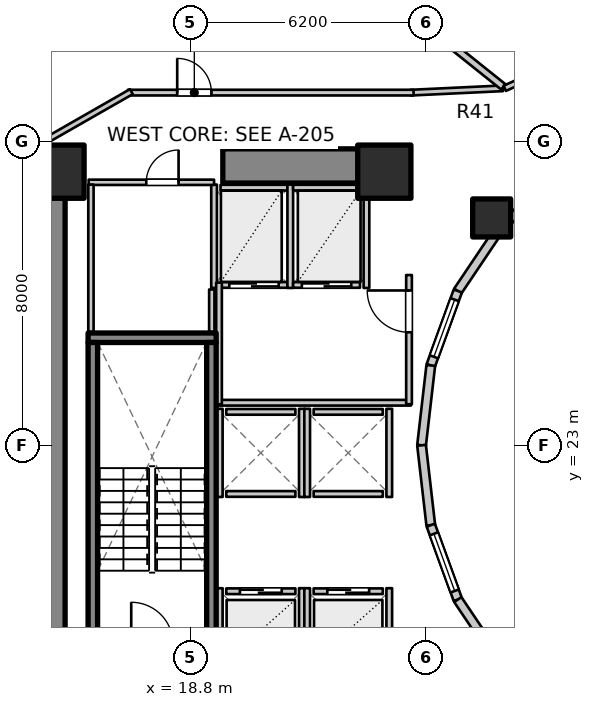
"""IFC4 building model, lengths in metres.
Left out: names, types, materials, properties, quantities, classifications, styles, units other than length and angle.
Written with IfcOpenShell. Run it as: python <this file> out.ifc"""

import sys

from ifc_helpers import new_model, si_unit, direction, frame, frame_2d, origin, origin_2d, place, context, subcontext, project, spatial, rectangle, extrude, element, fill, save


model = new_model("IFC4")
c1 = context("Model", 3, precision=1e-05, world=origin(), true_north=direction((0.0, 1.0)))
c2 = subcontext(c1, "Body", "Model", "MODEL_VIEW")
j1 = project(units=[si_unit("LENGTHUNIT", "METRE"), si_unit("PLANEANGLEUNIT", "RADIAN")], contexts=[c1])
p1 = place(None, origin())
s1 = spatial("IfcSite", under=j1, at=p1, CompositionType="ELEMENT")
p2 = place(p1, origin())
s2 = spatial("IfcBuilding", under=s1, at=p2, CompositionType="ELEMENT")
p3 = place(p2, frame((0.0, 0.0, 27.6)))
s3 = spatial("IfcBuildingStorey", under=s2, at=p3, CompositionType="ELEMENT", Elevation=27.6)
p4 = place(p3, frame((15.05, 17.05, 0.0), z_axis=(0.0, 0.0, 1.0), x_axis=(0.0, 1.0, 0.0)))
e1 = element("IfcWall", 1, at=p4, inside=s3, PredefinedType="SHEAR", context=c2, shape_type="SweptSolid", body=[
    extrude(rectangle(XDim=12.8, YDim=0.9, at=frame_2d((6.4, 0.0))), origin(), (0.0, 0.0, 1.0), 3.1),
])
p5 = place(p3, frame((19.65, 30.35, 0.0), z_axis=(0.0, 0.0, 1.0), x_axis=(1.0, 0.0, 0.0)))
e2 = element("IfcWall", 2, at=p5, inside=s3, PredefinedType="SHEAR", context=c2, shape_type="SweptSolid", body=[
    extrude(rectangle(XDim=4.5, YDim=0.9, at=frame_2d((2.25, 0.0))), origin(), (0.0, 0.0, 1.0), 3.1),
])
p6 = place(p3, frame((16.105, 25.83, 0.0), z_axis=(0.0, 0.0, 1.0), x_axis=(1.0, 0.0, 0.0)))
e3 = element("IfcWall", 3, at=p6, inside=s3, PredefinedType="SOLIDWALL", context=c2, shape_type="SweptSolid", body=[
    extrude(rectangle(XDim=3.37, YDim=0.25, at=frame_2d((1.685, 0.0))), origin(), (0.0, 0.0, 1.0), 3.1),
])
for number, where, z_axis, x_axis in (
    (4, (16.23, 17.895, 0.0), (0.0, 0.0, 1.0), (0.0, 1.0, 0.0)),
    (5, (19.35, 17.895, 0.0), (0.0, 0.0, 1.0), (0.0, 1.0, 0.0)),
):
    element("IfcWall", number, at=place(p3, frame(where, z_axis=z_axis, x_axis=x_axis)), inside=s3, PredefinedType="SOLIDWALL", context=c2, shape_type="SweptSolid", body=[
        extrude(rectangle(XDim=7.81, YDim=0.25, at=frame_2d((3.905, 0.0))), origin(), (0.0, 0.0, 1.0), 3.1),
    ])
for number, where, z_axis, x_axis in (
    (6, (23.9, 30.2, 0.0), (0.0, 0.0, 1.0), (1.0, 0.0, 0.0)),
    (7, (15.3, 30.2, 0.0), (0.0, 0.0, 1.0), (1.0, 0.0, 0.0)),
):
    element("IfcColumn", number, at=place(p3, frame(where, z_axis=z_axis, x_axis=x_axis)), inside=s3, PredefinedType="COLUMN", context=c2, shape_type="SweptSolid", body=[
        extrude(rectangle(XDim=1.4, YDim=1.4, at=origin_2d()), origin(), (0.0, 0.0, 1.0), 3.1),
    ])
p7 = place(p3, frame((26.725, 28.982, 0.0), z_axis=(0.0, 0.0, 1.0), x_axis=(1.0, 0.0, 0.0)))
e8 = element("IfcColumn", 8, at=p7, inside=s3, PredefinedType="COLUMN", context=c2, shape_type="SweptSolid", body=[
    extrude(rectangle(XDim=1.0, YDim=1.0, at=origin_2d()), origin(), (0.0, 0.0, 1.0), 3.1),
])
p8 = place(p3, frame((28.44, 30.032, 0.0), z_axis=(0.0, 0.0, 1.0), x_axis=(-0.752576694707, -0.658504607869, 0.0)))
e9 = element("IfcWall", 9, at=p8, inside=s3, PredefinedType="STANDARD", context=c2, shape_type="SweptSolid", body=[
    extrude(rectangle(XDim=1.959, YDim=0.23, at=frame_2d((0.98, 0.0))), origin(), (0.0, 0.0, 1.0), 2.16),
])
p9 = place(p3, frame((26.965, 28.742, 0.0), z_axis=(0.0, 0.0, 1.0), x_axis=(-0.558197800898, -0.829707909492, 0.0)))
e10 = element("IfcWall", 10, at=p9, inside=s3, PredefinedType="STANDARD", context=c2, shape_type="SweptSolid", body=[
    extrude(rectangle(XDim=2.027, YDim=0.23, at=frame_2d((1.013, 0.0))), origin(), (0.0, 0.0, 1.0), 2.16),
])
p10 = place(p3, frame((25.834, 27.06, 0.0), z_axis=(0.0, 0.0, 1.0), x_axis=(-0.341423187295, -0.93990968033, 0.0)))
e11 = element("IfcWall", 11, at=p10, inside=s3, PredefinedType="STANDARD", context=c2, shape_type="SweptSolid", body=[
    extrude(rectangle(XDim=2.084, YDim=0.23, at=frame_2d((1.042, 0.0))), origin(), (0.0, 0.0, 1.0), 2.84),
])
p11 = place(p10, frame((0.242, 0.0, 0.85)))
e12 = element("IfcOpeningElement", 12, at=p11, cuts=e11, PredefinedType="OPENING", context=c2, shape_type="SweptSolid", body=[
    extrude(rectangle(XDim=1.6, YDim=1.65, at=frame_2d((0.8, 0.825))), frame((0.0, 0.125, 0.0), z_axis=(0.0, -1.0, 0.0), x_axis=(1.0, 0.0, 0.0)), (0.0, 0.0, 1.0), 0.25),
])
for number, where, z_axis, x_axis in (
    (13, (25.123, 25.102, 0.0), (0.0, 0.0, 1.0), (-0.115, -0.993, 0.0)),
    (14, (24.88, 23.0, 0.0), (0.0, 0.0, 1.0), (0.115, -0.993, 0.0)),
):
    element("IfcWall", number, at=place(p3, frame(where, z_axis=z_axis, x_axis=x_axis)), inside=s3, PredefinedType="STANDARD", context=c2, shape_type="SweptSolid", body=[
        extrude(rectangle(XDim=2.115, YDim=0.23, at=frame_2d((1.058, 0.0))), origin(), (0.0, 0.0, 1.0), 2.84),
    ])
p12 = place(p3, frame((25.123, 20.898, 0.0), z_axis=(0.0, 0.0, 1.0), x_axis=(0.341423187295, -0.93990968033, 0.0)))
e15 = element("IfcWall", 15, at=p12, inside=s3, PredefinedType="STANDARD", context=c2, shape_type="SweptSolid", body=[
    extrude(rectangle(XDim=2.084, YDim=0.23, at=frame_2d((1.042, 0.0))), origin(), (0.0, 0.0, 1.0), 2.84),
])
p13 = place(p12, frame((0.242, 0.0, 0.85)))
e16 = element("IfcOpeningElement", 16, at=p13, cuts=e15, PredefinedType="OPENING", context=c2, shape_type="SweptSolid", body=[
    extrude(rectangle(XDim=1.6, YDim=1.65, at=frame_2d((0.8, 0.825))), frame((0.0, 0.125, 0.0), z_axis=(0.0, -1.0, 0.0), x_axis=(1.0, 0.0, 0.0)), (0.0, 0.0, 1.0), 0.25),
])
p14 = place(p3, frame((25.834, 18.94, 0.0), z_axis=(0.0, 0.0, 1.0), x_axis=(0.558197800898, -0.829707909492, 0.0)))
e17 = element("IfcWall", 17, at=p14, inside=s3, PredefinedType="STANDARD", context=c2, shape_type="SweptSolid", body=[
    extrude(rectangle(XDim=2.027, YDim=0.23, at=frame_2d((1.013, 0.0))), origin(), (0.0, 0.0, 1.0), 2.16),
])
p15 = place(p3, frame((19.74, 19.16, 0.0), z_axis=(0.0, 0.0, 1.0), x_axis=(1.0, 0.0, 0.0)))
e18 = element("IfcWall", 18, at=p15, inside=s3, PredefinedType="SOLIDWALL", context=c2, shape_type="SweptSolid", body=[
    extrude(rectangle(XDim=1.82, YDim=0.15, at=frame_2d((0.91, 0.0))), origin(), (0.0, 0.0, 1.0), 2.855),
])
p16 = place(p15, frame((0.36, 0.0, 0.0)))
e19 = element("IfcOpeningElement", 19, at=p16, cuts=e18, PredefinedType="OPENING", context=c2, shape_type="SweptSolid", body=[
    extrude(rectangle(XDim=1.1, YDim=2.1, at=frame_2d((0.55, 1.05))), frame((0.0, 0.085, 0.0), z_axis=(0.0, -1.0, 0.0), x_axis=(1.0, 0.0, 0.0)), (0.0, 0.0, 1.0), 0.17),
])
p17 = place(p3, frame((19.57, 17.02, 0.0), z_axis=(0.0, 0.0, 1.0), x_axis=(0.0, 1.0, 0.0)))
e20 = element("IfcWall", 20, at=p17, inside=s3, PredefinedType="SOLIDWALL", context=c2, shape_type="SweptSolid", body=[
    extrude(rectangle(XDim=2.22, YDim=0.15, at=frame_2d((1.11, 0.0))), origin(), (0.0, 0.0, 1.0), 2.12),
])
p18 = place(p3, frame((21.73, 17.02, 0.0), z_axis=(0.0, 0.0, 1.0), x_axis=(0.0, 1.0, 0.0)))
e21 = element("IfcWall", 21, at=p18, inside=s3, PredefinedType="SOLIDWALL", context=c2, shape_type="SweptSolid", body=[
    extrude(rectangle(XDim=2.22, YDim=0.15, at=frame_2d((1.11, 0.0))), origin(), (0.0, 0.0, 1.0), 2.855),
])
p19 = place(p3, frame((22.04, 19.16, 0.0), z_axis=(0.0, 0.0, 1.0), x_axis=(1.0, 0.0, 0.0)))
e22 = element("IfcWall", 22, at=p19, inside=s3, PredefinedType="SOLIDWALL", context=c2, shape_type="SweptSolid", body=[
    extrude(rectangle(XDim=1.82, YDim=0.15, at=frame_2d((0.91, 0.0))), origin(), (0.0, 0.0, 1.0), 2.12),
])
p20 = place(p19, frame((0.36, 0.0, 0.0)))
e23 = element("IfcOpeningElement", 23, at=p20, cuts=e22, PredefinedType="OPENING", context=c2, shape_type="SweptSolid", body=[
    extrude(rectangle(XDim=1.1, YDim=2.1, at=frame_2d((0.55, 1.05))), frame((0.0, 0.085, 0.0), z_axis=(0.0, -1.0, 0.0), x_axis=(1.0, 0.0, 0.0)), (0.0, 0.0, 1.0), 0.17),
])
p21 = place(p3, frame((21.87, 17.02, 0.0), z_axis=(0.0, 0.0, 1.0), x_axis=(0.0, 1.0, 0.0)))
e24 = element("IfcWall", 24, at=p21, inside=s3, PredefinedType="SOLIDWALL", context=c2, shape_type="SweptSolid", body=[
    extrude(rectangle(XDim=2.22, YDim=0.15, at=frame_2d((1.11, 0.0))), origin(), (0.0, 0.0, 1.0), 2.855),
])
p22 = place(p3, frame((24.03, 17.02, 0.0), z_axis=(0.0, 0.0, 1.0), x_axis=(0.0, 1.0, 0.0)))
e25 = element("IfcWall", 25, at=p22, inside=s3, PredefinedType="SOLIDWALL", context=c2, shape_type="SweptSolid", body=[
    extrude(rectangle(XDim=2.22, YDim=0.15, at=frame_2d((1.11, 0.0))), origin(), (0.0, 0.0, 1.0), 2.12),
])
for number, where, z_axis, x_axis in (
    (26, (19.74, 21.72, 0.0), (0.0, 0.0, 1.0), (1.0, 0.0, 0.0)),
    (27, (19.74, 23.88, 0.0), (0.0, 0.0, 1.0), (1.0, 0.0, 0.0)),
):
    element("IfcWall", number, at=place(p3, frame(where, z_axis=z_axis, x_axis=x_axis)), inside=s3, PredefinedType="SOLIDWALL", context=c2, shape_type="SweptSolid", body=[
        extrude(rectangle(XDim=1.82, YDim=0.15, at=frame_2d((0.91, 0.0))), origin(), (0.0, 0.0, 1.0), 2.855),
    ])
for number, where, z_axis, x_axis in (
    (28, (19.57, 21.64, 0.0), (0.0, 0.0, 1.0), (0.0, 1.0, 0.0)),
    (29, (21.73, 21.64, 0.0), (0.0, 0.0, 1.0), (0.0, 1.0, 0.0)),
):
    element("IfcWall", number, at=place(p3, frame(where, z_axis=z_axis, x_axis=x_axis)), inside=s3, PredefinedType="SOLIDWALL", context=c2, shape_type="SweptSolid", body=[
        extrude(rectangle(XDim=2.32, YDim=0.15, at=frame_2d((1.16, 0.0))), origin(), (0.0, 0.0, 1.0), 2.855),
    ])
for number, where, z_axis, x_axis in (
    (30, (22.04, 21.72, 0.0), (0.0, 0.0, 1.0), (1.0, 0.0, 0.0)),
    (31, (22.04, 23.88, 0.0), (0.0, 0.0, 1.0), (1.0, 0.0, 0.0)),
):
    element("IfcWall", number, at=place(p3, frame(where, z_axis=z_axis, x_axis=x_axis)), inside=s3, PredefinedType="SOLIDWALL", context=c2, shape_type="SweptSolid", body=[
        extrude(rectangle(XDim=1.82, YDim=0.15, at=frame_2d((0.91, 0.0))), origin(), (0.0, 0.0, 1.0), 2.12),
    ])
p23 = place(p3, frame((21.87, 21.64, 0.0), z_axis=(0.0, 0.0, 1.0), x_axis=(0.0, 1.0, 0.0)))
e32 = element("IfcWall", 32, at=p23, inside=s3, PredefinedType="SOLIDWALL", context=c2, shape_type="SweptSolid", body=[
    extrude(rectangle(XDim=2.32, YDim=0.15, at=frame_2d((1.16, 0.0))), origin(), (0.0, 0.0, 1.0), 2.855),
])
p24 = place(p3, frame((24.03, 21.64, 0.0), z_axis=(0.0, 0.0, 1.0), x_axis=(0.0, 1.0, 0.0)))
e33 = element("IfcWall", 33, at=p24, inside=s3, PredefinedType="SOLIDWALL", context=c2, shape_type="SweptSolid", body=[
    extrude(rectangle(XDim=2.32, YDim=0.15, at=frame_2d((1.16, 0.0))), origin(), (0.0, 0.0, 1.0), 2.12),
])
p25 = place(p3, frame((19.59, 27.22, 0.0), z_axis=(0.0, 0.0, 1.0), x_axis=(1.0, 0.0, 0.0)))
e34 = element("IfcWall", 34, at=p25, inside=s3, PredefinedType="SOLIDWALL", context=c2, shape_type="SweptSolid", body=[
    extrude(rectangle(XDim=1.76, YDim=0.15, at=frame_2d((0.88, 0.0))), origin(), (0.0, 0.0, 1.0), 2.855),
])
p26 = place(p25, frame((0.23, 0.0, 0.0)))
e35 = element("IfcOpeningElement", 35, at=p26, cuts=e34, PredefinedType="OPENING", context=c2, shape_type="SweptSolid", body=[
    extrude(rectangle(XDim=1.3, YDim=2.1, at=frame_2d((0.65, 1.05))), frame((0.0, 0.085, 0.0), z_axis=(0.0, -1.0, 0.0), x_axis=(1.0, 0.0, 0.0)), (0.0, 0.0, 1.0), 0.17),
])
p27 = place(p3, frame((19.59, 29.78, 0.0), z_axis=(0.0, 0.0, 1.0), x_axis=(1.0, 0.0, 0.0)))
e36 = element("IfcWall", 36, at=p27, inside=s3, PredefinedType="SOLIDWALL", context=c2, shape_type="SweptSolid", body=[
    extrude(rectangle(XDim=1.76, YDim=0.15, at=frame_2d((0.88, 0.0))), origin(), (0.0, 0.0, 1.0), 2.855),
])
for number, where, z_axis, x_axis in (
    (37, (19.42, 27.14, 0.0), (0.0, 0.0, 1.0), (0.0, 1.0, 0.0)),
    (38, (21.425, 27.14, 0.0), (0.0, 0.0, 1.0), (0.0, 1.0, 0.0)),
):
    element("IfcWall", number, at=place(p3, frame(where, z_axis=z_axis, x_axis=x_axis)), inside=s3, PredefinedType="SOLIDWALL", context=c2, shape_type="SweptSolid", body=[
        extrude(rectangle(XDim=2.72, YDim=0.15, at=frame_2d((1.36, 0.0))), origin(), (0.0, 0.0, 1.0), 2.855),
    ])
p28 = place(p3, frame((21.5, 27.22, 0.0), z_axis=(0.0, 0.0, 1.0), x_axis=(1.0, 0.0, 0.0)))
e39 = element("IfcWall", 39, at=p28, inside=s3, PredefinedType="SOLIDWALL", context=c2, shape_type="SweptSolid", body=[
    extrude(rectangle(XDim=1.76, YDim=0.15, at=frame_2d((0.88, 0.0))), origin(), (0.0, 0.0, 1.0), 2.855),
])
p29 = place(p28, frame((0.23, 0.0, 0.0)))
e40 = element("IfcOpeningElement", 40, at=p29, cuts=e39, PredefinedType="OPENING", context=c2, shape_type="SweptSolid", body=[
    extrude(rectangle(XDim=1.3, YDim=2.1, at=frame_2d((0.65, 1.05))), frame((0.0, 0.085, 0.0), z_axis=(0.0, -1.0, 0.0), x_axis=(1.0, 0.0, 0.0)), (0.0, 0.0, 1.0), 0.17),
])
p30 = place(p3, frame((21.5, 29.78, 0.0), z_axis=(0.0, 0.0, 1.0), x_axis=(1.0, 0.0, 0.0)))
e41 = element("IfcWall", 41, at=p30, inside=s3, PredefinedType="SOLIDWALL", context=c2, shape_type="SweptSolid", body=[
    extrude(rectangle(XDim=1.76, YDim=0.15, at=frame_2d((0.88, 0.0))), origin(), (0.0, 0.0, 1.0), 2.855),
])
p31 = place(p3, frame((23.43, 27.14, 0.0), z_axis=(0.0, 0.0, 1.0), x_axis=(0.0, 1.0, 0.0)))
e42 = element("IfcWall", 42, at=p31, inside=s3, PredefinedType="SOLIDWALL", context=c2, shape_type="SweptSolid", body=[
    extrude(rectangle(XDim=2.72, YDim=0.15, at=frame_2d((1.36, 0.0))), origin(), (0.0, 0.0, 1.0), 2.855),
])
p32 = place(p3, frame((19.52, 24.12, 0.0), z_axis=(0.0, 0.0, 1.0), x_axis=(1.0, 0.0, 0.0)))
e43 = element("IfcWall", 43, at=p32, inside=s3, PredefinedType="PARTITIONING", context=c2, shape_type="SweptSolid", body=[
    extrude(rectangle(XDim=5.08, YDim=0.15, at=frame_2d((2.54, 0.0))), origin(), (0.0, 0.0, 1.0), 2.12),
])
p33 = place(p3, frame((19.55, 24.08, 0.0), z_axis=(0.0, 0.0, 1.0), x_axis=(0.0, 1.0, 0.0)))
e44 = element("IfcWall", 44, at=p33, inside=s3, PredefinedType="PARTITIONING", context=c2, shape_type="SweptSolid", body=[
    extrude(rectangle(XDim=3.2, YDim=0.15, at=frame_2d((1.6, 0.0))), origin(), (0.0, 0.0, 1.0), 2.855),
])
p34 = place(p3, frame((24.55, 24.08, 0.0), z_axis=(0.0, 0.0, 1.0), x_axis=(0.0, 1.0, 0.0)))
e45 = element("IfcWall", 45, at=p34, inside=s3, PredefinedType="PARTITIONING", context=c2, shape_type="SweptSolid", body=[
    extrude(rectangle(XDim=3.4, YDim=0.15, at=frame_2d((1.7, 0.0))), origin(), (0.0, 0.0, 1.0), 2.855),
])
p35 = place(p34, frame((1.894, 0.0, 0.0)))
e46 = element("IfcOpeningElement", 46, at=p35, cuts=e45, PredefinedType="OPENING", context=c2, shape_type="SweptSolid", body=[
    extrude(rectangle(XDim=1.1, YDim=2.1, at=frame_2d((0.55, 1.05))), frame((0.0, 0.085, 0.0), z_axis=(0.0, -1.0, 0.0), x_axis=(1.0, 0.0, 0.0)), (0.0, 0.0, 1.0), 0.17),
])
p36 = place(p3, frame((16.12, 29.92, 0.0), z_axis=(0.0, 0.0, 1.0), x_axis=(1.0, 0.0, 0.0)))
e47 = element("IfcWall", 47, at=p36, inside=s3, PredefinedType="PLUMBINGWALL", context=c2, shape_type="SweptSolid", body=[
    extrude(rectangle(XDim=3.3, YDim=0.14, at=frame_2d((1.65, 0.0))), origin(), (0.0, 0.0, 1.0), 2.855),
])
p37 = place(p36, frame((1.516, 0.0, 0.0)))
e48 = element("IfcOpeningElement", 48, at=p37, cuts=e47, PredefinedType="OPENING", context=c2, shape_type="SweptSolid", body=[
    extrude(rectangle(XDim=0.85, YDim=2.05, at=frame_2d((0.425, 1.025))), frame((0.0, 0.08, 0.0), z_axis=(0.0, -1.0, 0.0), x_axis=(1.0, 0.0, 0.0)), (0.0, 0.0, 1.0), 0.16),
])
p38 = place(p3, frame((16.18, 25.98, 0.0), z_axis=(0.0, 0.0, 1.0), x_axis=(0.0, 1.0, 0.0)))
e49 = element("IfcWall", 49, at=p38, inside=s3, PredefinedType="PLUMBINGWALL", context=c2, shape_type="SweptSolid", body=[
    extrude(rectangle(XDim=3.88, YDim=0.14, at=frame_2d((1.94, 0.0))), origin(), (0.0, 0.0, 1.0), 2.855),
])
p39 = place(p3, frame((19.36, 25.98, 0.0), z_axis=(0.0, 0.0, 1.0), x_axis=(0.0, 1.0, 0.0)))
e50 = element("IfcWall", 50, at=p39, inside=s3, PredefinedType="PLUMBINGWALL", context=c2, shape_type="SweptSolid", body=[
    extrude(rectangle(XDim=1.12, YDim=0.14, at=frame_2d((0.56, 0.0))), origin(), (0.0, 0.0, 1.0), 2.855),
])
p40 = place(p3, frame((27.02, 32.394, 0.0), z_axis=(0.0, 0.0, 1.0), x_axis=(-0.998877427952, -0.047369651964, 0.0)))
e51 = element("IfcWall", 51, at=p40, inside=s3, PredefinedType="PARTITIONING", context=c2, shape_type="SweptSolid", body=[
    extrude(rectangle(XDim=2.433, YDim=0.15, at=frame_2d((1.216, 0.0))), origin(), (0.0, 0.0, 1.0), 2.237),
])
p41 = place(p3, frame((17.15, 32.28, 0.0), z_axis=(0.0, 0.0, 1.0), x_axis=(1.0, 0.0, 0.0)))
e52 = element("IfcWall", 52, at=p41, inside=s3, PredefinedType="PARTITIONING", context=c2, shape_type="SweptSolid", body=[
    extrude(rectangle(XDim=7.52, YDim=0.15, at=frame_2d((3.76, 0.0))), origin(), (0.0, 0.0, 1.0), 2.237),
])
p42 = place(p41, frame((1.3, 0.0, 0.0)))
e53 = element("IfcOpeningElement", 53, at=p42, cuts=e52, PredefinedType="OPENING", context=c2, shape_type="SweptSolid", body=[
    extrude(rectangle(XDim=0.9, YDim=2.1, at=frame_2d((0.45, 1.05))), frame((0.0, 0.085, 0.0), z_axis=(0.0, -1.0, 0.0), x_axis=(1.0, 0.0, 0.0)), (0.0, 0.0, 1.0), 0.17),
])
p43 = place(p3, frame((17.243, 32.305, 0.0), z_axis=(0.0, 0.0, 1.0), x_axis=(-0.867991349648, -0.496579315857, 0.0)))
e54 = element("IfcWall", 54, at=p43, inside=s3, PredefinedType="PARTITIONING", context=c2, shape_type="SweptSolid", body=[
    extrude(rectangle(XDim=2.567, YDim=0.15, at=frame_2d((1.283, 0.0))), origin(), (0.0, 0.0, 1.0), 2.069),
])
p44 = place(p3, frame((27.032, 32.431, 0.0), z_axis=(0.0, 0.0, 1.0), x_axis=(-0.781055486744, 0.624461629428, 0.0)))
e55 = element("IfcWall", 55, at=p44, inside=s3, PredefinedType="PARTITIONING", context=c2, shape_type="SweptSolid", body=[
    extrude(rectangle(XDim=10.843, YDim=0.18, at=frame_2d((5.422, 0.0))), origin(), (0.0, 0.0, 1.0), 2.237),
])
p45 = place(p3, frame((29.457, 33.482, 0.0), z_axis=(0.0, 0.0, 1.0), x_axis=(-0.909747571199, -0.415161843982, 0.0)))
e56 = element("IfcWall", 56, at=p45, inside=s3, PredefinedType="PARTITIONING", context=c2, shape_type="SweptSolid", body=[
    extrude(rectangle(XDim=2.625, YDim=0.15, at=frame_2d((1.312, 0.0))), origin(), (0.0, 0.0, 1.0), 2.237),
])
p46 = place(p45, frame((0.838, 0.0, 0.0)))
e57 = element("IfcOpeningElement", 57, at=p46, cuts=e56, PredefinedType="OPENING", context=c2, shape_type="SweptSolid", body=[
    extrude(rectangle(XDim=0.95, YDim=2.1, at=frame_2d((0.475, 1.05))), frame((0.0, 0.085, 0.0), z_axis=(0.0, -1.0, 0.0), x_axis=(1.0, 0.0, 0.0)), (0.0, 0.0, 1.0), 0.17),
])
p47 = place(p11, origin())
e58 = element("IfcWindow", 58, at=p47, inside=s3, PartitioningType="SINGLE_PANEL", PredefinedType="WINDOW", context=c2, shape_type="SweptSolid", body=[
    extrude(rectangle(XDim=1.6, YDim=1.65, at=frame_2d((0.8, 0.825))), frame((0.0, 0.03, 0.0), z_axis=(0.0, -1.0, 0.0), x_axis=(1.0, 0.0, 0.0)), (0.0, 0.0, 1.0), 0.06),
])
fill(e12, e58)
p48 = place(p13, origin())
e59 = element("IfcWindow", 59, at=p48, inside=s3, PartitioningType="SINGLE_PANEL", PredefinedType="WINDOW", context=c2, shape_type="SweptSolid", body=[
    extrude(rectangle(XDim=1.6, YDim=1.65, at=frame_2d((0.8, 0.825))), frame((0.0, 0.03, 0.0), z_axis=(0.0, -1.0, 0.0), x_axis=(1.0, 0.0, 0.0)), (0.0, 0.0, 1.0), 0.06),
])
fill(e16, e59)
p49 = place(p16, origin())
e60 = element("IfcDoor", 60, at=p49, inside=s3, OperationType="DOUBLE_DOOR_SLIDING", PredefinedType="DOOR", context=c2, shape_type="SweptSolid", body=[
    extrude(rectangle(XDim=1.1, YDim=2.1, at=frame_2d((0.55, 1.05))), frame((0.0, 0.025, 0.0), z_axis=(0.0, -1.0, 0.0), x_axis=(1.0, 0.0, 0.0)), (0.0, 0.0, 1.0), 0.05),
])
fill(e19, e60)
p50 = place(p20, origin())
e61 = element("IfcDoor", 61, at=p50, inside=s3, OperationType="DOUBLE_DOOR_SLIDING", PredefinedType="DOOR", context=c2, shape_type="SweptSolid", body=[
    extrude(rectangle(XDim=1.1, YDim=2.1, at=frame_2d((0.55, 1.05))), frame((0.0, 0.025, 0.0), z_axis=(0.0, -1.0, 0.0), x_axis=(1.0, 0.0, 0.0)), (0.0, 0.0, 1.0), 0.05),
])
fill(e23, e61)
p51 = place(p26, origin())
e62 = element("IfcDoor", 62, at=p51, inside=s3, OperationType="DOUBLE_DOOR_SLIDING", PredefinedType="DOOR", context=c2, shape_type="SweptSolid", body=[
    extrude(rectangle(XDim=1.3, YDim=2.1, at=frame_2d((0.65, 1.05))), frame((0.0, 0.025, 0.0), z_axis=(0.0, -1.0, 0.0), x_axis=(1.0, 0.0, 0.0)), (0.0, 0.0, 1.0), 0.05),
])
fill(e35, e62)
p52 = place(p29, origin())
e63 = element("IfcDoor", 63, at=p52, inside=s3, OperationType="DOUBLE_DOOR_SLIDING", PredefinedType="DOOR", context=c2, shape_type="SweptSolid", body=[
    extrude(rectangle(XDim=1.3, YDim=2.1, at=frame_2d((0.65, 1.05))), frame((0.0, 0.025, 0.0), z_axis=(0.0, -1.0, 0.0), x_axis=(1.0, 0.0, 0.0)), (0.0, 0.0, 1.0), 0.05),
])
fill(e40, e63)
p53 = place(p35, origin())
e64 = element("IfcDoor", 64, at=p53, inside=s3, OperationType="SINGLE_SWING_RIGHT", PredefinedType="DOOR", context=c2, shape_type="SweptSolid", body=[
    extrude(rectangle(XDim=1.1, YDim=2.1, at=frame_2d((0.55, 1.05))), frame((0.0, 0.025, 0.0), z_axis=(0.0, -1.0, 0.0), x_axis=(1.0, 0.0, 0.0)), (0.0, 0.0, 1.0), 0.05),
])
fill(e46, e64)
p54 = place(p37, origin())
e65 = element("IfcDoor", 65, at=p54, inside=s3, OperationType="SINGLE_SWING_RIGHT", PredefinedType="DOOR", context=c2, shape_type="SweptSolid", body=[
    extrude(rectangle(XDim=0.85, YDim=2.05, at=frame_2d((0.425, 1.025))), frame((0.0, 0.025, 0.0), z_axis=(0.0, -1.0, 0.0), x_axis=(1.0, 0.0, 0.0)), (0.0, 0.0, 1.0), 0.05),
])
fill(e48, e65)
p55 = place(p42, origin())
e66 = element("IfcDoor", 66, at=p55, inside=s3, OperationType="SINGLE_SWING_LEFT", PredefinedType="DOOR", context=c2, shape_type="SweptSolid", body=[
    extrude(rectangle(XDim=0.9, YDim=2.1, at=frame_2d((0.45, 1.05))), frame((0.0, 0.025, 0.0), z_axis=(0.0, -1.0, 0.0), x_axis=(1.0, 0.0, 0.0)), (0.0, 0.0, 1.0), 0.05),
])
fill(e53, e66)
save(model, sys.argv[1])
